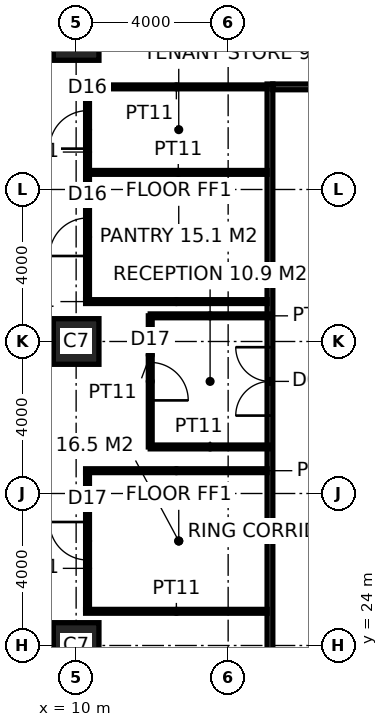
"""IFC4 building model, lengths in metres.
Left out: names, types, materials, properties, quantities, classifications, styles, units other than length and angle.
Written with IfcOpenShell. Run it as: python <this file> out.ifc"""

import sys

from ifc_helpers import new_model, si_unit, direction, frame, frame_2d, origin, origin_2d, place, context, subcontext, project, spatial, rectangle, hollow_rectangle, extrude, element, fill, save


model = new_model("IFC4")
c1 = context("Model", 3, precision=1e-05, world=origin(), true_north=direction((0.0, 1.0)))
c2 = subcontext(c1, "Body", "Model", "MODEL_VIEW")
j1 = project(units=[si_unit("LENGTHUNIT", "METRE"), si_unit("PLANEANGLEUNIT", "RADIAN")], contexts=[c1])
p1 = place(None, origin())
s1 = spatial("IfcSite", under=j1, at=p1, CompositionType="ELEMENT")
p2 = place(p1, origin())
s2 = spatial("IfcBuilding", under=s1, at=p2, CompositionType="ELEMENT")
p3 = place(p2, frame((0.0, 0.0, 27.0)))
s3 = spatial("IfcBuildingStorey", under=s2, at=p3, CompositionType="ELEMENT", Elevation=27.0)
for number, where, z_axis, x_axis in (
    (1, (10.0, 24.0, 0.0), (0.0, 0.0, 1.0), (1.0, 0.0, 0.0)),
    (2, (10.0, 32.0, 0.0), (0.0, 0.0, 1.0), (1.0, 0.0, 0.0)),
    (3, (10.0, 40.0, 0.0), (0.0, 0.0, 1.0), (1.0, 0.0, 0.0)),
):
    element("IfcColumn", number, at=place(p3, frame(where, z_axis=z_axis, x_axis=x_axis)), inside=s3, PredefinedType="COLUMN", context=c2, shape_type="SweptSolid", body=[
        extrude(hollow_rectangle(XDim=1.2, YDim=1.2, WallThickness=0.1, at=origin_2d()), origin(), (0.0, 0.0, 1.0), 4.0),
    ])
p4 = place(p3, frame((15.1, 15.225, 0.0), z_axis=(0.0, 0.0, 1.0), x_axis=(0.0, 1.0, 0.0)))
e4 = element("IfcWall", 4, at=p4, inside=s3, PredefinedType="PARTITIONING", context=c2, shape_type="SweptSolid", body=[
    extrude(rectangle(XDim=23.55, YDim=0.15, at=frame_2d((11.775, 0.0))), origin(), (0.0, 0.0, 1.0), 3.85),
])
p5 = place(p4, frame((3.175, 0.0, 0.0)))
e5 = element("IfcOpeningElement", 5, at=p5, cuts=e4, PredefinedType="OPENING", context=c2, shape_type="SweptSolid", body=[
    extrude(rectangle(XDim=1.8, YDim=2.4, at=frame_2d((0.9, 1.2))), frame((0.0, 0.085, 0.0), z_axis=(0.0, -1.0, 0.0), x_axis=(1.0, 0.0, 0.0)), (0.0, 0.0, 1.0), 0.17),
])
p6 = place(p4, frame((14.825, 0.0, 0.0)))
e6 = element("IfcOpeningElement", 6, at=p6, cuts=e4, PredefinedType="OPENING", context=c2, shape_type="SweptSolid", body=[
    extrude(rectangle(XDim=1.8, YDim=2.4, at=frame_2d((0.9, 1.2))), frame((0.0, 0.085, 0.0), z_axis=(0.0, -1.0, 0.0), x_axis=(1.0, 0.0, 0.0)), (0.0, 0.0, 1.0), 0.17),
])
p7 = place(p3, frame((15.175, 38.7, 0.0), z_axis=(0.0, 0.0, 1.0), x_axis=(1.0, 0.0, 0.0)))
e7 = element("IfcWall", 7, at=p7, inside=s3, PredefinedType="PARTITIONING", context=c2, shape_type="SweptSolid", body=[
    extrude(rectangle(XDim=29.05, YDim=0.15, at=frame_2d((14.525, 0.0))), origin(), (0.0, 0.0, 1.0), 3.85),
])
p8 = place(p7, frame((8.575, 0.0, 0.0)))
e8 = element("IfcOpeningElement", 8, at=p8, cuts=e7, PredefinedType="OPENING", context=c2, shape_type="SweptSolid", body=[
    extrude(rectangle(XDim=0.9, YDim=2.1, at=frame_2d((0.45, 1.05))), frame((0.0, 0.085, 0.0), z_axis=(0.0, -1.0, 0.0), x_axis=(1.0, 0.0, 0.0)), (0.0, 0.0, 1.0), 0.17),
])
p9 = place(p7, frame((12.325, 0.0, 0.0)))
e9 = element("IfcOpeningElement", 9, at=p9, cuts=e7, PredefinedType="OPENING", context=c2, shape_type="SweptSolid", body=[
    extrude(rectangle(XDim=1.0, YDim=2.1, at=frame_2d((0.5, 1.05))), frame((0.0, 0.085, 0.0), z_axis=(0.0, -1.0, 0.0), x_axis=(1.0, 0.0, 0.0)), (0.0, 0.0, 1.0), 0.17),
])
p10 = place(p7, frame((16.175, 0.0, 0.0)))
e10 = element("IfcOpeningElement", 10, at=p10, cuts=e7, PredefinedType="OPENING", context=c2, shape_type="SweptSolid", body=[
    extrude(rectangle(XDim=0.9, YDim=2.1, at=frame_2d((0.45, 1.05))), frame((0.0, 0.085, 0.0), z_axis=(0.0, -1.0, 0.0), x_axis=(1.0, 0.0, 0.0)), (0.0, 0.0, 1.0), 0.17),
])
for number, where, z_axis, x_axis in (
    (11, (10.25, 24.9, 0.0), (0.0, 0.0, 1.0), (1.0, 0.0, 0.0)),
    (12, (10.25, 28.6, 0.0), (0.0, 0.0, 1.0), (1.0, 0.0, 0.0)),
    (13, (10.25, 33.05, 0.0), (0.0, 0.0, 1.0), (1.0, 0.0, 0.0)),
):
    element("IfcWall", number, at=place(p3, frame(where, z_axis=z_axis, x_axis=x_axis)), inside=s3, PredefinedType="PARTITIONING", context=c2, shape_type="SweptSolid", body=[
        extrude(rectangle(XDim=4.775, YDim=0.1, at=frame_2d((2.387, 0.0))), origin(), (0.0, 0.0, 1.0), 3.85),
    ])
p11 = place(p3, frame((10.35, 36.45, 0.0), z_axis=(0.0, 0.0, 1.0), x_axis=(1.0, 0.0, 0.0)))
e14 = element("IfcWall", 14, at=p11, inside=s3, PredefinedType="PARTITIONING", context=c2, shape_type="SweptSolid", body=[
    extrude(rectangle(XDim=4.675, YDim=0.1, at=frame_2d((2.337, 0.0))), origin(), (0.0, 0.0, 1.0), 2.85),
])
p12 = place(p3, frame((10.25, 38.7, 0.0), z_axis=(0.0, 0.0, 1.0), x_axis=(1.0, 0.0, 0.0)))
e15 = element("IfcWall", 15, at=p12, inside=s3, PredefinedType="PARTITIONING", context=c2, shape_type="SweptSolid", body=[
    extrude(rectangle(XDim=4.775, YDim=0.1, at=frame_2d((2.387, 0.0))), origin(), (0.0, 0.0, 1.0), 3.85),
])
p13 = place(p3, frame((10.3, 24.95, 0.0), z_axis=(0.0, 0.0, 1.0), x_axis=(0.0, 1.0, 0.0)))
e16 = element("IfcWall", 16, at=p13, inside=s3, PredefinedType="PARTITIONING", context=c2, shape_type="SweptSolid", body=[
    extrude(rectangle(XDim=3.6, YDim=0.1, at=frame_2d((1.8, 0.0))), origin(), (0.0, 0.0, 1.0), 3.85),
])
p14 = place(p13, frame((1.3, 0.0, 0.0)))
e17 = element("IfcOpeningElement", 17, at=p14, cuts=e16, PredefinedType="OPENING", context=c2, shape_type="SweptSolid", body=[
    extrude(rectangle(XDim=1.0, YDim=2.2, at=frame_2d((0.5, 1.1))), frame((0.0, 0.06, 0.0), z_axis=(0.0, -1.0, 0.0), x_axis=(1.0, 0.0, 0.0)), (0.0, 0.0, 1.0), 0.12),
])
p15 = place(p3, frame((10.3, 33.1, 0.0), z_axis=(0.0, 0.0, 1.0), x_axis=(0.0, 1.0, 0.0)))
e18 = element("IfcWall", 18, at=p15, inside=s3, PredefinedType="PARTITIONING", context=c2, shape_type="SweptSolid", body=[
    extrude(rectangle(XDim=5.55, YDim=0.1, at=frame_2d((2.775, 0.0))), origin(), (0.0, 0.0, 1.0), 2.95),
])
p16 = place(p15, frame((1.15, 0.0, 0.0)))
e19 = element("IfcOpeningElement", 19, at=p16, cuts=e18, PredefinedType="OPENING", context=c2, shape_type="SweptSolid", body=[
    extrude(rectangle(XDim=1.0, YDim=2.2, at=frame_2d((0.5, 1.1))), frame((0.0, 0.06, 0.0), z_axis=(0.0, -1.0, 0.0), x_axis=(1.0, 0.0, 0.0)), (0.0, 0.0, 1.0), 0.12),
])
p17 = place(p15, frame((3.975, 0.0, 0.0)))
e20 = element("IfcOpeningElement", 20, at=p17, cuts=e18, PredefinedType="OPENING", context=c2, shape_type="SweptSolid", body=[
    extrude(rectangle(XDim=1.0, YDim=2.2, at=frame_2d((0.5, 1.1))), frame((0.0, 0.06, 0.0), z_axis=(0.0, -1.0, 0.0), x_axis=(1.0, 0.0, 0.0)), (0.0, 0.0, 1.0), 0.12),
])
p18 = place(p3, frame((15.1, 32.675, 0.0), z_axis=(0.0, 0.0, 1.0), x_axis=(-1.0, 0.0, 0.0)))
e21 = element("IfcWall", 21, at=p18, inside=s3, PredefinedType="PARTITIONING", context=c2, shape_type="SweptSolid", body=[
    extrude(rectangle(XDim=3.15, YDim=0.1, at=frame_2d((1.575, 0.0))), origin(), (0.0, 0.0, 1.0), 3.85),
])
p19 = place(p3, frame((11.95, 32.675, 0.0), z_axis=(0.0, 0.0, 1.0), x_axis=(0.0, -1.0, 0.0)))
e22 = element("IfcWall", 22, at=p19, inside=s3, PredefinedType="PARTITIONING", context=c2, shape_type="SweptSolid", body=[
    extrude(rectangle(XDim=3.45, YDim=0.1, at=frame_2d((1.725, 0.0))), origin(), (0.0, 0.0, 1.0), 3.85),
])
p20 = place(p19, frame((1.225, 0.0, 0.0)))
e23 = element("IfcOpeningElement", 23, at=p20, cuts=e22, PredefinedType="OPENING", context=c2, shape_type="SweptSolid", body=[
    extrude(rectangle(XDim=1.0, YDim=2.2, at=frame_2d((0.5, 1.1))), frame((0.0, 0.06, 0.0), z_axis=(0.0, -1.0, 0.0), x_axis=(1.0, 0.0, 0.0)), (0.0, 0.0, 1.0), 0.12),
])
p21 = place(p3, frame((11.95, 29.225, 0.0), z_axis=(0.0, 0.0, 1.0), x_axis=(1.0, 0.0, 0.0)))
e24 = element("IfcWall", 24, at=p21, inside=s3, PredefinedType="PARTITIONING", context=c2, shape_type="SweptSolid", body=[
    extrude(rectangle(XDim=3.15, YDim=0.1, at=frame_2d((1.575, 0.0))), origin(), (0.0, 0.0, 1.0), 3.85),
])
p22 = place(p6, origin())
e25 = element("IfcDoor", 25, at=p22, inside=s3, OperationType="DOUBLE_DOOR_DOUBLE_SWING", PredefinedType="DOOR", context=c2, shape_type="SweptSolid", body=[
    extrude(rectangle(XDim=1.8, YDim=2.4, at=frame_2d((0.9, 1.2))), frame((0.0, 0.025, 0.0), z_axis=(0.0, -1.0, 0.0), x_axis=(1.0, 0.0, 0.0)), (0.0, 0.0, 1.0), 0.05),
])
fill(e6, e25)
p23 = place(p16, origin())
e26 = element("IfcDoor", 26, at=p23, inside=s3, OperationType="SINGLE_SWING_LEFT", PredefinedType="DOOR", context=c2, shape_type="SweptSolid", body=[
    extrude(rectangle(XDim=1.0, YDim=2.2, at=frame_2d((0.5, 1.1))), frame((0.0, 0.025, 0.0), z_axis=(0.0, -1.0, 0.0), x_axis=(1.0, 0.0, 0.0)), (0.0, 0.0, 1.0), 0.05),
])
fill(e19, e26)
p24 = place(p17, origin())
e27 = element("IfcDoor", 27, at=p24, inside=s3, OperationType="SINGLE_SWING_LEFT", PredefinedType="DOOR", context=c2, shape_type="SweptSolid", body=[
    extrude(rectangle(XDim=1.0, YDim=2.2, at=frame_2d((0.5, 1.1))), frame((0.0, 0.025, 0.0), z_axis=(0.0, -1.0, 0.0), x_axis=(1.0, 0.0, 0.0)), (0.0, 0.0, 1.0), 0.05),
])
fill(e20, e27)
p25 = place(p14, origin())
e28 = element("IfcDoor", 28, at=p25, inside=s3, OperationType="SINGLE_SWING_RIGHT", PredefinedType="DOOR", context=c2, shape_type="SweptSolid", body=[
    extrude(rectangle(XDim=1.0, YDim=2.2, at=frame_2d((0.5, 1.1))), frame((0.0, 0.025, 0.0), z_axis=(0.0, -1.0, 0.0), x_axis=(1.0, 0.0, 0.0)), (0.0, 0.0, 1.0), 0.05),
])
fill(e17, e28)
p26 = place(p20, origin())
e29 = element("IfcDoor", 29, at=p26, inside=s3, OperationType="SINGLE_SWING_RIGHT", PredefinedType="DOOR", context=c2, shape_type="SweptSolid", body=[
    extrude(rectangle(XDim=1.0, YDim=2.2, at=frame_2d((0.5, 1.1))), frame((0.0, 0.025, 0.0), z_axis=(0.0, -1.0, 0.0), x_axis=(1.0, 0.0, 0.0)), (0.0, 0.0, 1.0), 0.05),
])
fill(e23, e29)
save(model, sys.argv[1])
